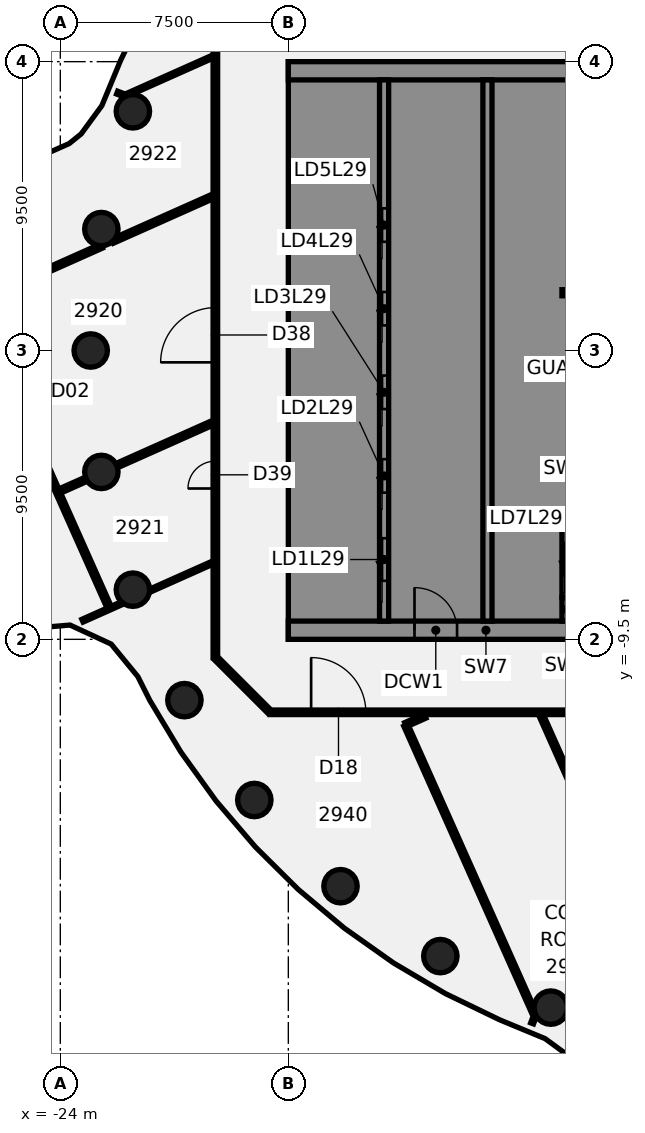
"""IFC4 building model, lengths in metres.
Left out: names, types, materials, properties, quantities, classifications, styles, units other than length and angle.
Written with IfcOpenShell. Run it as: python <this file> out.ifc"""

import sys

from ifc_helpers import new_model, si_unit, direction, frame, frame_2d, origin, origin_2d, place, context, subcontext, project, spatial, polyline, rectangle, circle, outline, extrude, element, fill, save


model = new_model("IFC4")
c1 = context("Model", 3, precision=1e-05, world=origin(), true_north=direction((0.0, 1.0)))
c2 = subcontext(c1, "Body", "Model", "MODEL_VIEW")
j1 = project(units=[si_unit("LENGTHUNIT", "METRE"), si_unit("PLANEANGLEUNIT", "RADIAN")], contexts=[c1])
p1 = place(None, origin())
s1 = spatial("IfcSite", under=j1, at=p1, CompositionType="ELEMENT")
p2 = place(p1, origin())
s2 = spatial("IfcBuilding", under=s1, at=p2, CompositionType="ELEMENT")
p3 = place(p2, frame((0.0, 0.0, 121.0)))
s3 = spatial("IfcBuildingStorey", under=s2, at=p3, CompositionType="ELEMENT", Elevation=121.0)
for number, where, z_axis, x_axis in (
    (1, (-21.613, 7.866, -0.14), (0.0, 0.0, 1.0), (1.0, 0.0, 0.0)),
    (2, (-22.651, 3.994, -0.14), (0.0, 0.0, 1.0), (1.0, 0.0, 0.0)),
    (3, (-23.0, 0.0, -0.14), (0.0, 0.0, 1.0), (1.0, 0.0, 0.0)),
    (4, (-22.651, -3.994, -0.14), (0.0, 0.0, 1.0), (1.0, 0.0, 0.0)),
    (5, (-21.613, -7.866, -0.14), (0.0, 0.0, 1.0), (1.0, 0.0, 0.0)),
    (6, (-19.919, -11.5, -0.14), (0.0, 0.0, 1.0), (1.0, 0.0, 0.0)),
    (7, (-17.619, -14.784, -0.14), (0.0, 0.0, 1.0), (1.0, 0.0, 0.0)),
    (8, (-14.784, -17.619, -0.14), (0.0, 0.0, 1.0), (1.0, 0.0, 0.0)),
    (9, (-11.5, -19.919, -0.14), (0.0, 0.0, 1.0), (1.0, 0.0, 0.0)),
    (10, (-7.866, -21.613, -0.14), (0.0, 0.0, 1.0), (1.0, 0.0, 0.0)),
):
    element("IfcColumn", number, at=place(p3, frame(where, z_axis=z_axis, x_axis=x_axis)), inside=s3, PredefinedType="COLUMN", context=c2, shape_type="SweptSolid", body=[
        extrude(circle(Radius=0.55, at=origin_2d()), origin(), (0.0, 0.0, 1.0), 3.75),
    ])
p4 = place(p3, frame((-28.198, 4.571, 0.0), z_axis=(0.0, 0.0, 1.0), x_axis=(0.40727361365, -0.913306193795, 0.0)))
e11 = element("IfcWall", 11, at=p4, inside=s3, PredefinedType="PARTITIONING", context=c2, shape_type="SweptSolid", body=[
    extrude(rectangle(XDim=14.244, YDim=0.15, at=frame_2d((7.122, 0.0))), origin(), (0.0, 0.0, 1.0), 3.01),
])
p5 = place(p4, frame((5.799, 0.0, 0.0)))
e12 = element("IfcOpeningElement", 12, at=p5, cuts=e11, PredefinedType="OPENING", context=c2, shape_type="SweptSolid", body=[
    extrude(rectangle(XDim=1.4, YDim=2.1, at=frame_2d((0.7, 1.05))), frame((0.0, 0.085, 0.0), z_axis=(0.0, -1.0, 0.0), x_axis=(1.0, 0.0, 0.0)), (0.0, 0.0, 1.0), 0.17),
])
p6 = place(p3, frame((-12.634, -12.326, 0.0), z_axis=(0.0, 0.0, 1.0), x_axis=(0.407133799184, -0.913368528887, 0.0)))
e13 = element("IfcWall", 13, at=p6, inside=s3, PredefinedType="PARTITIONING", context=c2, shape_type="SweptSolid", body=[
    extrude(rectangle(XDim=10.421, YDim=0.15, at=frame_2d((5.21, 0.0))), origin(), (0.0, 0.0, 1.0), 3.01),
])
p7 = place(p3, frame((-8.187, -11.987, 0.0), z_axis=(0.0, 0.0, 1.0), x_axis=(0.407231277155, -0.91332507187, 0.0)))
e14 = element("IfcWall", 14, at=p7, inside=s3, PredefinedType="PARTITIONING", context=c2, shape_type="SweptSolid", body=[
    extrude(rectangle(XDim=11.273, YDim=0.15, at=frame_2d((5.637, 0.0))), origin(), (0.0, 0.0, 1.0), 3.01),
])
p8 = place(p7, frame((6.655, 0.0, 0.0)))
e15 = element("IfcOpeningElement", 15, at=p8, cuts=e14, PredefinedType="OPENING", context=c2, shape_type="SweptSolid", body=[
    extrude(rectangle(XDim=0.9, YDim=2.1, at=frame_2d((0.45, 1.05))), frame((0.0, 0.085, 0.0), z_axis=(0.0, -1.0, 0.0), x_axis=(1.0, 0.0, 0.0)), (0.0, 0.0, 1.0), 0.17),
])
p9 = place(p3, frame((-18.872, -10.128, 0.0), z_axis=(0.0, 0.0, 1.0), x_axis=(0.707106781187, -0.707106781187, 0.0)))
e16 = element("IfcWall", 16, at=p9, inside=s3, PredefinedType="PARTITIONING", context=c2, shape_type="SweptSolid", body=[
    extrude(rectangle(XDim=2.465, YDim=0.15, at=frame_2d((1.232, 0.0))), origin(), (0.0, 0.0, 1.0), 3.01),
])
p10 = place(p3, frame((-22.131, 8.481, 0.0), z_axis=(0.0, 0.0, 1.0), x_axis=(0.934418057451, -0.356178177193, 0.0)))
e17 = element("IfcWall", 17, at=p10, inside=s3, PredefinedType="PARTITIONING", context=c2, shape_type="SweptSolid", body=[
    extrude(rectangle(XDim=0.222, YDim=0.1, at=frame_2d((0.111, 0.0))), origin(), (0.0, 0.0, 1.0), 3.01),
])
p11 = place(p3, frame((-17.1, -11.9, 0.0), z_axis=(0.0, 0.0, 1.0), x_axis=(1.0, 0.0, 0.0)))
e18 = element("IfcWall", 18, at=p11, inside=s3, PredefinedType="PARTITIONING", context=c2, shape_type="SweptSolid", body=[
    extrude(rectangle(XDim=34.165, YDim=0.15, at=frame_2d((17.083, 0.0))), origin(), (0.0, 0.0, 1.0), 3.01),
])
p12 = place(p11, frame((11.724, 0.0, 0.0)))
e19 = element("IfcOpeningElement", 19, at=p12, cuts=e18, PredefinedType="OPENING", context=c2, shape_type="SweptSolid", body=[
    extrude(rectangle(XDim=1.8, YDim=2.1, at=frame_2d((0.9, 1.05))), frame((0.0, 0.085, 0.0), z_axis=(0.0, -1.0, 0.0), x_axis=(1.0, 0.0, 0.0)), (0.0, 0.0, 1.0), 0.17),
])
p13 = place(p11, frame((1.35, 0.0, 0.0)))
e20 = element("IfcOpeningElement", 20, at=p13, cuts=e18, PredefinedType="OPENING", context=c2, shape_type="SweptSolid", body=[
    extrude(rectangle(XDim=1.8, YDim=2.1, at=frame_2d((0.9, 1.05))), frame((0.0, 0.085, 0.0), z_axis=(0.0, -1.0, 0.0), x_axis=(1.0, 0.0, 0.0)), (0.0, 0.0, 1.0), 0.17),
])
p14 = place(p11, frame((26.618, 0.0, 0.0)))
e21 = element("IfcOpeningElement", 21, at=p14, cuts=e18, PredefinedType="OPENING", context=c2, shape_type="SweptSolid", body=[
    extrude(rectangle(XDim=1.8, YDim=2.1, at=frame_2d((0.9, 1.05))), frame((0.0, 0.085, 0.0), z_axis=(0.0, -1.0, 0.0), x_axis=(1.0, 0.0, 0.0)), (0.0, 0.0, 1.0), 0.17),
])
p15 = place(p3, frame((-26.782, 1.591, 0.0), z_axis=(0.0, 0.0, 1.0), x_axis=(0.913317594787, 0.4072480461, 0.0)))
e22 = element("IfcWall", 22, at=p15, inside=s3, PredefinedType="PARTITIONING", context=c2, shape_type="SweptSolid", body=[
    extrude(rectangle(XDim=4.531, YDim=0.15, at=frame_2d((2.266, 0.0))), origin(), (0.0, 0.0, 1.0), 3.01),
])
p16 = place(p15, frame((1.27, 0.0, 0.0)))
e23 = element("IfcOpeningElement", 23, at=p16, cuts=e22, PredefinedType="OPENING", context=c2, shape_type="SweptSolid", body=[
    extrude(rectangle(XDim=0.9, YDim=2.1, at=frame_2d((0.45, 1.05))), frame((0.0, 0.085, 0.0), z_axis=(0.0, -1.0, 0.0), x_axis=(1.0, 0.0, 0.0)), (0.0, 0.0, 1.0), 0.17),
])
p17 = place(p3, frame((-22.283, 3.597, 0.0), z_axis=(0.0, 0.0, 1.0), x_axis=(0.913319907559, 0.407242859307, 0.0)))
e24 = element("IfcWall", 24, at=p17, inside=s3, PredefinedType="PARTITIONING", context=c2, shape_type="SweptSolid", body=[
    extrude(rectangle(XDim=3.609, YDim=0.15, at=frame_2d((1.804, 0.0))), origin(), (0.0, 0.0, 1.0), 3.01),
])
p18 = place(p3, frame((-24.013, -4.62, 0.0), z_axis=(0.0, 0.0, 1.0), x_axis=(0.913312231487, 0.407260073928, 0.0)))
e25 = element("IfcWall", 25, at=p18, inside=s3, PredefinedType="PARTITIONING", context=c2, shape_type="SweptSolid", body=[
    extrude(rectangle(XDim=0.949, YDim=0.15, at=frame_2d((0.475, 0.0))), origin(), (0.0, 0.0, 1.0), 3.01),
])
p19 = place(p3, frame((-22.146, -3.788, 0.0), z_axis=(0.0, 0.0, 1.0), x_axis=(0.913278113034, 0.407336578585, 0.0)))
e26 = element("IfcWall", 26, at=p19, inside=s3, PredefinedType="PARTITIONING", context=c2, shape_type="SweptSolid", body=[
    extrude(rectangle(XDim=3.459, YDim=0.15, at=frame_2d((1.729, 0.0))), origin(), (0.0, 0.0, 1.0), 3.01),
])
p20 = place(p3, frame((-23.271, -8.888, 0.0), z_axis=(0.0, 0.0, 1.0), x_axis=(0.913352665592, 0.407169385214, 0.0)))
e27 = element("IfcWall", 27, at=p20, inside=s3, PredefinedType="PARTITIONING", context=c2, shape_type="SweptSolid", body=[
    extrude(rectangle(XDim=1.45, YDim=0.1, at=frame_2d((0.725, 0.0))), origin(), (0.0, 0.0, 1.0), 3.01),
])
p21 = place(p3, frame((-21.063, -7.903, 0.0), z_axis=(0.0, 0.0, 1.0), x_axis=(0.913374440908, 0.407120535832, 0.0)))
e28 = element("IfcWall", 28, at=p21, inside=s3, PredefinedType="PARTITIONING", context=c2, shape_type="SweptSolid", body=[
    extrude(rectangle(XDim=2.283, YDim=0.1, at=frame_2d((1.142, 0.0))), origin(), (0.0, 0.0, 1.0), 3.01),
])
p22 = place(p3, frame((-21.913, 8.36, 0.0), z_axis=(0.0, 0.0, 1.0), x_axis=(0.913372506339, 0.407124876007, 0.0)))
e29 = element("IfcWall", 29, at=p22, inside=s3, PredefinedType="PARTITIONING", context=c2, shape_type="SweptSolid", body=[
    extrude(rectangle(XDim=3.214, YDim=0.1, at=frame_2d((1.607, 0.0))), origin(), (0.0, 0.0, 1.0), 3.01),
])
p23 = place(p3, frame((-12.642, -12.308, 0.0), z_axis=(0.0, 0.0, 1.0), x_axis=(0.913247290994, 0.407405676803, 0.0)))
e30 = element("IfcWall", 30, at=p23, inside=s3, PredefinedType="PARTITIONING", context=c2, shape_type="SweptSolid", body=[
    extrude(rectangle(XDim=0.697, YDim=0.15, at=frame_2d((0.349, 0.0))), origin(), (0.0, 0.0, 1.0), 3.01),
])
p24 = place(p3, frame((-8.481, -22.131, 0.0), z_axis=(0.0, 0.0, 1.0), x_axis=(0.355671431092, 0.934611059803, 0.0)))
e31 = element("IfcWall", 31, at=p24, inside=s3, PredefinedType="PARTITIONING", context=c2, shape_type="SweptSolid", body=[
    extrude(rectangle(XDim=0.282, YDim=0.1, at=frame_2d((0.141, 0.0))), origin(), (0.0, 0.0, 1.0), 3.01),
])
p25 = place(p3, frame((-18.9, -10.1, 0.0), z_axis=(0.0, 0.0, 1.0), x_axis=(0.0, 1.0, 0.0)))
e32 = element("IfcWall", 32, at=p25, inside=s3, PredefinedType="PARTITIONING", context=c2, shape_type="SweptSolid", body=[
    extrude(rectangle(XDim=20.2, YDim=0.15, at=frame_2d((10.1, 0.0))), origin(), (0.0, 0.0, 1.0), 3.01),
])
p26 = place(p25, frame((9.71, 0.0, 0.0)))
e33 = element("IfcOpeningElement", 33, at=p26, cuts=e32, PredefinedType="OPENING", context=c2, shape_type="SweptSolid", body=[
    extrude(rectangle(XDim=1.8, YDim=2.1, at=frame_2d((0.9, 1.05))), frame((0.0, 0.085, 0.0), z_axis=(0.0, -1.0, 0.0), x_axis=(1.0, 0.0, 0.0)), (0.0, 0.0, 1.0), 0.17),
])
p27 = place(p25, frame((5.561, 0.0, 0.0)))
e34 = element("IfcOpeningElement", 34, at=p27, cuts=e32, PredefinedType="OPENING", context=c2, shape_type="SweptSolid", body=[
    extrude(rectangle(XDim=0.9, YDim=2.1, at=frame_2d((0.45, 1.05))), frame((0.0, 0.085, 0.0), z_axis=(0.0, -1.0, 0.0), x_axis=(1.0, 0.0, 0.0)), (0.0, 0.0, 1.0), 0.17),
])
p28 = place(p3, frame((-16.5, -9.2, 0.0), z_axis=(0.0, 0.0, 1.0), x_axis=(1.0, 0.0, 0.0)))
e35 = element("IfcWall", 35, at=p28, inside=s3, PredefinedType="SHEAR", context=c2, shape_type="SweptSolid", body=[
    extrude(rectangle(XDim=13.0, YDim=0.6, at=frame_2d((6.5, 0.0))), origin(), (0.0, 0.0, 1.0), 3.61),
])
p29 = place(p28, frame((4.15, 0.0, 0.0)))
e36 = element("IfcOpeningElement", 36, at=p29, cuts=e35, PredefinedType="OPENING", context=c2, shape_type="SweptSolid", body=[
    extrude(rectangle(XDim=1.4, YDim=2.1, at=frame_2d((0.7, 1.05))), frame((0.0, 0.31, 0.0), z_axis=(0.0, -1.0, 0.0), x_axis=(1.0, 0.0, 0.0)), (0.0, 0.0, 1.0), 0.62),
])
p30 = place(p28, frame((10.125, 0.0, 0.0)))
e37 = element("IfcOpeningElement", 37, at=p30, cuts=e35, PredefinedType="OPENING", context=c2, shape_type="SweptSolid", body=[
    extrude(rectangle(XDim=1.4, YDim=2.1, at=frame_2d((0.7, 1.05))), frame((0.0, 0.31, 0.0), z_axis=(0.0, -1.0, 0.0), x_axis=(1.0, 0.0, 0.0)), (0.0, 0.0, 1.0), 0.62),
])
p31 = place(p3, origin())
e38 = element("IfcWall", 38, at=p31, inside=s3, PredefinedType="SHEAR", context=c2, shape_type="SweptSolid", body=[
    extrude(outline(polyline([(-13.5, -8.9), (-13.5, -8.125), (-15.9, -8.125), (-15.9, -5.625), (-13.5, -5.625), (-13.5, -5.375), (-15.9, -5.375), (-15.9, -2.875), (-13.5, -2.875), (-13.5, -2.625), (-15.9, -2.625), (-15.9, -0.125), (-13.5, -0.125), (-13.5, 0.125), (-15.9, 0.125), (-15.9, 2.625), (-13.5, 2.625), (-13.5, 2.875), (-15.9, 2.875), (-15.9, 5.375), (-13.5, 5.375), (-13.5, 5.625), (-15.9, 5.625), (-15.9, 8.125), (-13.5, 8.125), (-13.5, 8.9), (-15.9, 8.9), (-16.5, 8.9), (-16.5, -8.9), (-15.9, -8.9), (-13.5, -8.9)])), origin(), (0.0, 0.0, 1.0), 3.61),
])
p32 = place(p3, frame((-16.5, 9.2, 0.0), z_axis=(0.0, 0.0, 1.0), x_axis=(1.0, 0.0, 0.0)))
e39 = element("IfcWall", 39, at=p32, inside=s3, PredefinedType="SHEAR", context=c2, shape_type="SweptSolid", body=[
    extrude(rectangle(XDim=13.0, YDim=0.6, at=frame_2d((6.5, 0.0))), origin(), (0.0, 0.0, 1.0), 3.61),
])
p33 = place(p3, origin())
e40 = element("IfcWall", 40, at=p33, inside=s3, PredefinedType="SHEAR", context=c2, shape_type="SweptSolid", body=[
    extrude(outline(polyline([(-9.8, -5.375), (-9.8, -5.625), (-7.5, -5.625), (-7.2, -5.625), (-7.2, 8.9), (-7.5, 8.9), (-9.8, 8.9), (-9.8, 8.125), (-7.5, 8.125), (-7.5, 5.625), (-9.8, 5.625), (-9.8, 5.375), (-7.5, 5.375), (-7.5, 2.875), (-9.8, 2.875), (-9.8, 2.625), (-7.5, 2.625), (-7.5, 0.125), (-9.8, 0.125), (-9.8, -0.125), (-7.5, -0.125), (-7.5, -2.625), (-9.8, -2.625), (-9.8, -2.875), (-7.5, -2.875), (-7.5, -5.375), (-9.8, -5.375)])), origin(), (0.0, 0.0, 1.0), 3.61),
])
p34 = place(p3, origin())
e41 = element("IfcWall", 41, at=p34, inside=s3, PredefinedType="SHEAR", context=c2, shape_type="SweptSolid", body=[
    extrude(outline(polyline([(-7.5, -8.125), (-9.55, -8.125), (-9.55, -5.625), (-9.8, -5.625), (-9.8, -8.125), (-9.8, -8.9), (-7.5, -8.9), (-7.5, -8.125)])), origin(), (0.0, 0.0, 1.0), 3.61),
])
p35 = place(p3, frame((-7.35, -8.9, 0.0), z_axis=(0.0, 0.0, 1.0), x_axis=(0.0, 1.0, 0.0)))
e42 = element("IfcWall", 42, at=p35, inside=s3, PredefinedType="SHEAR", context=c2, shape_type="SweptSolid", body=[
    extrude(rectangle(XDim=0.775, YDim=0.3, at=frame_2d((0.387, 0.0))), origin(), (0.0, 0.0, 1.0), 3.61),
])
p36 = place(p3, frame((-7.5, 1.9, 0.0), z_axis=(0.0, 0.0, 1.0), x_axis=(1.0, 0.0, 0.0)))
e43 = element("IfcWall", 43, at=p36, inside=s3, PredefinedType="SHEAR", context=c2, shape_type="SweptSolid", body=[
    extrude(rectangle(XDim=3.3, YDim=0.2, at=frame_2d((1.65, 0.0))), origin(), (0.0, 0.0, 1.0), 3.61),
])
p37 = place(p3, frame((-13.35, -8.9, 0.0), z_axis=(0.0, 0.0, 1.0), x_axis=(0.0, 1.0, 0.0)))
e44 = element("IfcWall", 44, at=p37, inside=s3, PredefinedType="SHEAR", context=c2, shape_type="SweptSolid", body=[
    extrude(rectangle(XDim=17.8, YDim=0.3, at=frame_2d((8.9, 0.0))), origin(), (0.0, 0.0, 1.0), 3.61),
])
p38 = place(p37, frame((1.325, 0.0, 0.0)))
e45 = element("IfcOpeningElement", 45, at=p38, cuts=e44, PredefinedType="OPENING", context=c2, shape_type="SweptSolid", body=[
    extrude(rectangle(XDim=1.4, YDim=2.1, at=frame_2d((0.7, 1.05))), frame((0.0, 0.16, 0.0), z_axis=(0.0, -1.0, 0.0), x_axis=(1.0, 0.0, 0.0)), (0.0, 0.0, 1.0), 0.32),
])
p39 = place(p37, frame((4.225, 0.0, 0.0)))
e46 = element("IfcOpeningElement", 46, at=p39, cuts=e44, PredefinedType="OPENING", context=c2, shape_type="SweptSolid", body=[
    extrude(rectangle(XDim=1.1, YDim=2.1, at=frame_2d((0.55, 1.05))), frame((0.0, 0.16, 0.0), z_axis=(0.0, -1.0, 0.0), x_axis=(1.0, 0.0, 0.0)), (0.0, 0.0, 1.0), 0.32),
])
p40 = place(p37, frame((6.975, 0.0, 0.0)))
e47 = element("IfcOpeningElement", 47, at=p40, cuts=e44, PredefinedType="OPENING", context=c2, shape_type="SweptSolid", body=[
    extrude(rectangle(XDim=1.1, YDim=2.1, at=frame_2d((0.55, 1.05))), frame((0.0, 0.16, 0.0), z_axis=(0.0, -1.0, 0.0), x_axis=(1.0, 0.0, 0.0)), (0.0, 0.0, 1.0), 0.32),
])
p41 = place(p37, frame((9.725, 0.0, 0.0)))
e48 = element("IfcOpeningElement", 48, at=p41, cuts=e44, PredefinedType="OPENING", context=c2, shape_type="SweptSolid", body=[
    extrude(rectangle(XDim=1.1, YDim=2.1, at=frame_2d((0.55, 1.05))), frame((0.0, 0.16, 0.0), z_axis=(0.0, -1.0, 0.0), x_axis=(1.0, 0.0, 0.0)), (0.0, 0.0, 1.0), 0.32),
])
p42 = place(p37, frame((12.475, 0.0, 0.0)))
e49 = element("IfcOpeningElement", 49, at=p42, cuts=e44, PredefinedType="OPENING", context=c2, shape_type="SweptSolid", body=[
    extrude(rectangle(XDim=1.1, YDim=2.1, at=frame_2d((0.55, 1.05))), frame((0.0, 0.16, 0.0), z_axis=(0.0, -1.0, 0.0), x_axis=(1.0, 0.0, 0.0)), (0.0, 0.0, 1.0), 0.32),
])
p43 = place(p3, frame((-9.95, -8.9, 0.0), z_axis=(0.0, 0.0, 1.0), x_axis=(0.0, 1.0, 0.0)))
e50 = element("IfcWall", 50, at=p43, inside=s3, PredefinedType="SHEAR", context=c2, shape_type="SweptSolid", body=[
    extrude(rectangle(XDim=17.8, YDim=0.3, at=frame_2d((8.9, 0.0))), origin(), (0.0, 0.0, 1.0), 3.61),
])
p44 = place(p3, frame((-7.35, -8.125, 0.0), z_axis=(0.0, 0.0, 1.0), x_axis=(0.0, 1.0, 0.0)))
e51 = element("IfcWall", 51, at=p44, inside=s3, PredefinedType="SHEAR", context=c2, shape_type="SweptSolid", body=[
    extrude(rectangle(XDim=2.5, YDim=0.3, at=frame_2d((1.25, 0.0))), origin(), (0.0, 0.0, 1.0), 3.61),
])
p45 = place(p44, frame((0.7, 0.0, 0.0)))
e52 = element("IfcOpeningElement", 52, at=p45, cuts=e51, PredefinedType="OPENING", context=c2, shape_type="SweptSolid", body=[
    extrude(rectangle(XDim=1.1, YDim=2.1, at=frame_2d((0.55, 1.05))), frame((0.0, 0.16, 0.0), z_axis=(0.0, -1.0, 0.0), x_axis=(1.0, 0.0, 0.0)), (0.0, 0.0, 1.0), 0.32),
])
p46 = place(p13, frame((1.8, 0.0, 0.0), z_axis=(0.0, 0.0, 1.0), x_axis=(-1.0, 0.0, 0.0)))
e53 = element("IfcDoor", 53, at=p46, inside=s3, OperationType="DOUBLE_DOOR_SINGLE_SWING", PredefinedType="DOOR", context=c2, shape_type="SweptSolid", body=[
    extrude(rectangle(XDim=1.8, YDim=2.1, at=frame_2d((0.9, 1.05))), frame((0.0, 0.025, 0.0), z_axis=(0.0, -1.0, 0.0), x_axis=(1.0, 0.0, 0.0)), (0.0, 0.0, 1.0), 0.05),
])
fill(e20, e53)
p47 = place(p26, frame((1.8, 0.0, 0.0), z_axis=(0.0, 0.0, 1.0), x_axis=(-1.0, 0.0, 0.0)))
e54 = element("IfcDoor", 54, at=p47, inside=s3, OperationType="DOUBLE_DOOR_SINGLE_SWING", PredefinedType="DOOR", context=c2, shape_type="SweptSolid", body=[
    extrude(rectangle(XDim=1.8, YDim=2.1, at=frame_2d((0.9, 1.05))), frame((0.0, 0.025, 0.0), z_axis=(0.0, -1.0, 0.0), x_axis=(1.0, 0.0, 0.0)), (0.0, 0.0, 1.0), 0.05),
])
fill(e33, e54)
p48 = place(p27, origin())
e55 = element("IfcDoor", 55, at=p48, inside=s3, OperationType="SINGLE_SWING_RIGHT", PredefinedType="DOOR", context=c2, shape_type="SweptSolid", body=[
    extrude(rectangle(XDim=0.9, YDim=2.1, at=frame_2d((0.45, 1.05))), frame((0.0, 0.025, 0.0), z_axis=(0.0, -1.0, 0.0), x_axis=(1.0, 0.0, 0.0)), (0.0, 0.0, 1.0), 0.05),
])
fill(e34, e55)
p49 = place(p29, origin())
e56 = element("IfcDoor", 56, at=p49, inside=s3, OperationType="SINGLE_SWING_LEFT", PredefinedType="DOOR", context=c2, shape_type="SweptSolid", body=[
    extrude(rectangle(XDim=1.4, YDim=2.1, at=frame_2d((0.7, 1.05))), frame((0.0, 0.025, 0.0), z_axis=(0.0, -1.0, 0.0), x_axis=(1.0, 0.0, 0.0)), (0.0, 0.0, 1.0), 0.05),
])
fill(e36, e56)
p50 = place(p38, origin())
e57 = element("IfcDoor", 57, at=p50, inside=s3, OperationType="SLIDING_TO_LEFT", PredefinedType="DOOR", context=c2, shape_type="SweptSolid", body=[
    extrude(rectangle(XDim=1.4, YDim=2.1, at=frame_2d((0.7, 1.05))), frame((0.0, 0.025, 0.0), z_axis=(0.0, -1.0, 0.0), x_axis=(1.0, 0.0, 0.0)), (0.0, 0.0, 1.0), 0.05),
])
fill(e45, e57)
p51 = place(p39, origin())
e58 = element("IfcDoor", 58, at=p51, inside=s3, OperationType="SLIDING_TO_LEFT", PredefinedType="DOOR", context=c2, shape_type="SweptSolid", body=[
    extrude(rectangle(XDim=1.1, YDim=2.1, at=frame_2d((0.55, 1.05))), frame((0.0, 0.025, 0.0), z_axis=(0.0, -1.0, 0.0), x_axis=(1.0, 0.0, 0.0)), (0.0, 0.0, 1.0), 0.05),
])
fill(e46, e58)
p52 = place(p40, origin())
e59 = element("IfcDoor", 59, at=p52, inside=s3, OperationType="SLIDING_TO_LEFT", PredefinedType="DOOR", context=c2, shape_type="SweptSolid", body=[
    extrude(rectangle(XDim=1.1, YDim=2.1, at=frame_2d((0.55, 1.05))), frame((0.0, 0.025, 0.0), z_axis=(0.0, -1.0, 0.0), x_axis=(1.0, 0.0, 0.0)), (0.0, 0.0, 1.0), 0.05),
])
fill(e47, e59)
p53 = place(p41, origin())
e60 = element("IfcDoor", 60, at=p53, inside=s3, OperationType="SLIDING_TO_LEFT", PredefinedType="DOOR", context=c2, shape_type="SweptSolid", body=[
    extrude(rectangle(XDim=1.1, YDim=2.1, at=frame_2d((0.55, 1.05))), frame((0.0, 0.025, 0.0), z_axis=(0.0, -1.0, 0.0), x_axis=(1.0, 0.0, 0.0)), (0.0, 0.0, 1.0), 0.05),
])
fill(e48, e60)
p54 = place(p42, origin())
e61 = element("IfcDoor", 61, at=p54, inside=s3, OperationType="SLIDING_TO_LEFT", PredefinedType="DOOR", context=c2, shape_type="SweptSolid", body=[
    extrude(rectangle(XDim=1.1, YDim=2.1, at=frame_2d((0.55, 1.05))), frame((0.0, 0.025, 0.0), z_axis=(0.0, -1.0, 0.0), x_axis=(1.0, 0.0, 0.0)), (0.0, 0.0, 1.0), 0.05),
])
fill(e49, e61)
save(model, sys.argv[1])
